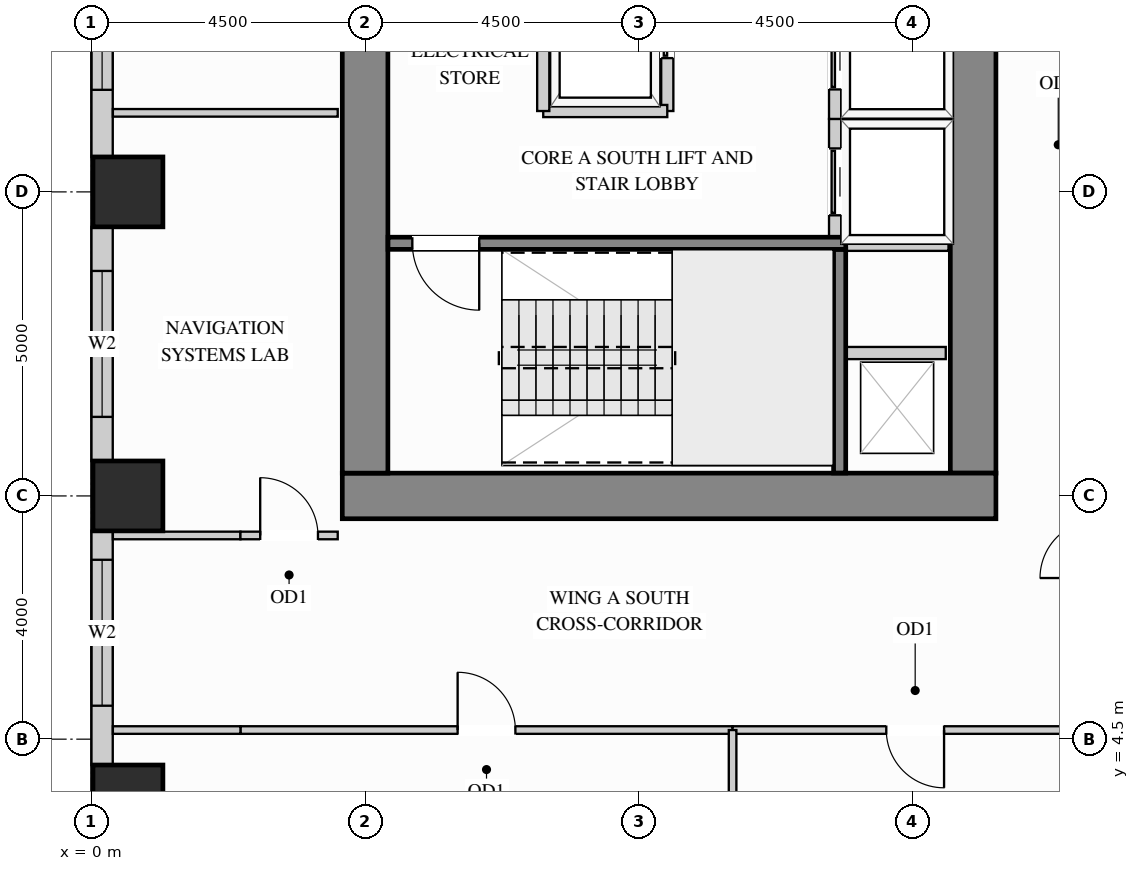
"""IFC4 building model, lengths in metres.
Left out: names, types, materials, properties, quantities, classifications, styles, units other than length and angle.
Written with IfcOpenShell. Run it as: python <this file> out.ifc"""

import sys

from ifc_helpers import new_model, si_unit, direction, frame, frame_2d, origin, origin_2d, place, context, subcontext, project, spatial, rectangle, extrude, source, transform, mapped, element, fill, save


model = new_model("IFC4")
c1 = context("Model", 3, precision=1e-05, world=origin(), true_north=direction((0.0, 1.0)))
c2 = subcontext(c1, "Body", "Model", "MODEL_VIEW")
j1 = project(units=[si_unit("LENGTHUNIT", "METRE"), si_unit("PLANEANGLEUNIT", "RADIAN")], contexts=[c1])
p1 = place(None, origin())
s1 = spatial("IfcSite", under=j1, at=p1, CompositionType="ELEMENT")
p2 = place(p1, origin())
s2 = spatial("IfcBuilding", under=s1, at=p2, CompositionType="ELEMENT")
p3 = place(p2, frame((0.0, 0.0, 77.4)))
s3 = spatial("IfcBuildingStorey", under=s2, at=p3, CompositionType="ELEMENT", Elevation=77.4)
m1 = source(origin(), c2, "Body", "SweptSolid", [
    extrude(rectangle(XDim=1.15, YDim=1.15, at=origin_2d()), origin(), (0.0, 0.0, 1.0), 3.38),
])
for number, where, z_axis, x_axis in (
    (1, (0.6, 13.5, 0.0), (0.0, 0.0, 1.0), (1.0, 0.0, 0.0)),
    (2, (0.6, 3.5, 0.0), (0.0, 0.0, 1.0), (1.0, 0.0, 0.0)),
    (3, (0.6, 8.5, 0.0), (0.0, 0.0, 1.0), (1.0, 0.0, 0.0)),
):
    element("IfcColumn", number, at=place(p3, frame(where, z_axis=z_axis, x_axis=x_axis)), inside=s3, PredefinedType="COLUMN", context=c2, shape_type="MappedRepresentation", body=[
        mapped(m1, transform((0.0, 0.0, 0.0), x_axis=(1.0, 0.0, 0.0), y_axis=(0.0, 1.0, 0.0), z_axis=(0.0, 0.0, 1.0))),
    ])
m2 = source(origin(), c2, "Body", "SweptSolid", [
    extrude(rectangle(XDim=9.945, YDim=0.75, at=frame_2d((4.973, 0.0))), origin(), (0.0, 0.0, 1.0), 3.38),
])
p4 = place(p3, frame((14.5, 8.875, 0.0), z_axis=(0.0, 0.0, 1.0), x_axis=(0.0, 1.0, 0.0)))
e4 = element("IfcWall", 4, at=p4, inside=s3, PredefinedType="SHEAR", context=c2, shape_type="MappedRepresentation", body=[
    mapped(m2, transform((0.0, 0.0, 0.0), x_axis=(1.0, 0.0, 0.0), y_axis=(0.0, 1.0, 0.0), z_axis=(0.0, 0.0, 1.0))),
])
m3 = source(origin(), c2, "Body", "SweptSolid", [
    extrude(rectangle(XDim=10.75, YDim=0.75, at=frame_2d((5.375, 0.0))), origin(), (0.0, 0.0, 1.0), 3.38),
])
p5 = place(p3, frame((4.125, 8.5, 0.0), z_axis=(0.0, 0.0, 1.0), x_axis=(1.0, 0.0, 0.0)))
e5 = element("IfcWall", 5, at=p5, inside=s3, PredefinedType="SHEAR", context=c2, shape_type="MappedRepresentation", body=[
    mapped(m3, transform((0.0, 0.0, 0.0), x_axis=(1.0, 0.0, 0.0), y_axis=(0.0, 1.0, 0.0), z_axis=(0.0, 0.0, 1.0))),
])
m4 = source(origin(), c2, "Body", "SweptSolid", [
    extrude(rectangle(XDim=20.25, YDim=0.75, at=frame_2d((10.125, 0.0))), origin(), (0.0, 0.0, 1.0), 3.38),
])
p6 = place(p3, frame((4.5, 8.875, 0.0), z_axis=(0.0, 0.0, 1.0), x_axis=(0.0, 1.0, 0.0)))
e6 = element("IfcWall", 6, at=p6, inside=s3, PredefinedType="SHEAR", context=c2, shape_type="MappedRepresentation", body=[
    mapped(m4, transform((0.0, 0.0, 0.0), x_axis=(1.0, 0.0, 0.0), y_axis=(0.0, 1.0, 0.0), z_axis=(0.0, 0.0, 1.0))),
])
p7 = place(p3, frame((0.175, 17.427, 0.0), z_axis=(0.0, 0.0, 1.0), x_axis=(0.0, -1.0, 0.0)))
e7 = element("IfcWall", 7, at=p7, inside=s3, PredefinedType="SOLIDWALL", context=c2, shape_type="SweptSolid", body=[
    extrude(rectangle(XDim=3.354, YDim=0.35, at=frame_2d((1.677, 0.0))), origin(), (0.0, 0.0, 1.0), 3.365),
])
p8 = place(p7, frame((0.448, 0.0, 0.78)))
e8 = element("IfcOpeningElement", 8, at=p8, cuts=e7, PredefinedType="OPENING", context=c2, shape_type="SweptSolid", body=[
    extrude(rectangle(XDim=1.8, YDim=2.1, at=frame_2d((0.9, 1.05))), frame((0.0, 0.185, 0.0), z_axis=(0.0, -1.0, 0.0), x_axis=(1.0, 0.0, 0.0)), (0.0, 0.0, 1.0), 0.37),
])
p9 = place(p3, frame((0.175, 12.927, 0.0), z_axis=(0.0, 0.0, 1.0), x_axis=(0.0, -1.0, 0.0)))
e9 = element("IfcWall", 9, at=p9, inside=s3, PredefinedType="SOLIDWALL", context=c2, shape_type="SweptSolid", body=[
    extrude(rectangle(XDim=3.854, YDim=0.35, at=frame_2d((1.927, 0.0))), origin(), (0.0, 0.0, 1.0), 3.365),
])
p10 = place(p9, frame((0.727, 0.0, 0.78)))
e10 = element("IfcOpeningElement", 10, at=p10, cuts=e9, PredefinedType="OPENING", context=c2, shape_type="SweptSolid", body=[
    extrude(rectangle(XDim=2.4, YDim=2.1, at=frame_2d((1.2, 1.05))), frame((0.0, 0.185, 0.0), z_axis=(0.0, -1.0, 0.0), x_axis=(1.0, 0.0, 0.0)), (0.0, 0.0, 1.0), 0.37),
])
p11 = place(p3, frame((0.175, 7.927, 0.0), z_axis=(0.0, 0.0, 1.0), x_axis=(0.0, -1.0, 0.0)))
e11 = element("IfcWall", 11, at=p11, inside=s3, PredefinedType="SOLIDWALL", context=c2, shape_type="SweptSolid", body=[
    extrude(rectangle(XDim=3.854, YDim=0.35, at=frame_2d((1.927, 0.0))), origin(), (0.0, 0.0, 1.0), 3.365),
])
p12 = place(p11, frame((0.477, 0.0, 0.78)))
e12 = element("IfcOpeningElement", 12, at=p12, cuts=e11, PredefinedType="OPENING", context=c2, shape_type="SweptSolid", body=[
    extrude(rectangle(XDim=2.4, YDim=2.1, at=frame_2d((1.2, 1.05))), frame((0.0, 0.185, 0.0), z_axis=(0.0, -1.0, 0.0), x_axis=(1.0, 0.0, 0.0)), (0.0, 0.0, 1.0), 0.37),
])
m5 = source(origin(), c2, "Body", "SweptSolid", [
    extrude(rectangle(XDim=2.098, YDim=0.125, at=frame_2d((1.049, 0.0))), origin(), (0.0, 0.0, 1.0), 3.365),
])
p13 = place(p3, frame((0.352, 7.85, 0.0), z_axis=(0.0, 0.0, 1.0), x_axis=(1.0, 0.0, 0.0)))
e13 = element("IfcWall", 13, at=p13, inside=s3, PredefinedType="PARTITIONING", context=c2, shape_type="MappedRepresentation", body=[
    mapped(m5, transform((0.0, 0.0, 0.0), x_axis=(1.0, 0.0, 0.0), y_axis=(0.0, 1.0, 0.0), z_axis=(0.0, 0.0, 1.0))),
])
p14 = place(p3, frame((2.45, 7.85, 0.0), z_axis=(0.0, 0.0, 1.0), x_axis=(1.0, 0.0, 0.0)))
e14 = element("IfcWall", 14, at=p14, inside=s3, PredefinedType="PARTITIONING", context=c2, shape_type="SweptSolid", body=[
    extrude(rectangle(XDim=1.6, YDim=0.125, at=frame_2d((0.8, 0.0))), origin(), (0.0, 0.0, 1.0), 3.365),
])
p15 = place(p14, frame((0.325, 0.0, 0.0)))
e15 = element("IfcOpeningElement", 15, at=p15, cuts=e14, PredefinedType="OPENING", context=c2, shape_type="SweptSolid", body=[
    extrude(rectangle(XDim=0.95, YDim=2.15, at=frame_2d((0.475, 1.075))), frame((0.0, 0.073, 0.0), z_axis=(0.0, -1.0, 0.0), x_axis=(1.0, 0.0, 0.0)), (0.0, 0.0, 1.0), 0.145),
])
p16 = place(p3, frame((2.45, 4.65, 0.0), z_axis=(0.0, 0.0, 1.0), x_axis=(1.0, 0.0, 0.0)))
e16 = element("IfcWall", 16, at=p16, inside=s3, PredefinedType="PARTITIONING", context=c2, shape_type="SweptSolid", body=[
    extrude(rectangle(XDim=8.094, YDim=0.125, at=frame_2d((4.047, 0.0))), origin(), (0.0, 0.0, 1.0), 2.828),
])
p17 = place(p16, frame((3.572, 0.0, 0.0)))
e17 = element("IfcOpeningElement", 17, at=p17, cuts=e16, PredefinedType="OPENING", context=c2, shape_type="SweptSolid", body=[
    extrude(rectangle(XDim=0.95, YDim=2.15, at=frame_2d((0.475, 1.075))), frame((0.0, 0.073, 0.0), z_axis=(0.0, -1.0, 0.0), x_axis=(1.0, 0.0, 0.0)), (0.0, 0.0, 1.0), 0.145),
])
p18 = place(p3, frame((10.544, 4.65, 0.0), z_axis=(0.0, 0.0, 1.0), x_axis=(1.0, 0.0, 0.0)))
e18 = element("IfcWall", 18, at=p18, inside=s3, PredefinedType="PARTITIONING", context=c2, shape_type="SweptSolid", body=[
    extrude(rectangle(XDim=6.006, YDim=0.125, at=frame_2d((3.003, 0.0))), origin(), (0.0, 0.0, 1.0), 2.828),
])
p19 = place(p18, frame((2.528, 0.0, 0.0)))
e19 = element("IfcOpeningElement", 19, at=p19, cuts=e18, PredefinedType="OPENING", context=c2, shape_type="SweptSolid", body=[
    extrude(rectangle(XDim=0.95, YDim=2.15, at=frame_2d((0.475, 1.075))), frame((0.0, 0.073, 0.0), z_axis=(0.0, -1.0, 0.0), x_axis=(1.0, 0.0, 0.0)), (0.0, 0.0, 1.0), 0.145),
])
m6 = source(origin(), c2, "Body", "SweptSolid", [
    extrude(rectangle(XDim=2.098, YDim=0.125, at=frame_2d((1.049, 0.0))), origin(), (0.0, 0.0, 1.0), 2.828),
])
p20 = place(p3, frame((0.352, 4.65, 0.0), z_axis=(0.0, 0.0, 1.0), x_axis=(1.0, 0.0, 0.0)))
e20 = element("IfcWall", 20, at=p20, inside=s3, PredefinedType="PARTITIONING", context=c2, shape_type="MappedRepresentation", body=[
    mapped(m6, transform((0.0, 0.0, 0.0), x_axis=(1.0, 0.0, 0.0), y_axis=(0.0, 1.0, 0.0), z_axis=(0.0, 0.0, 1.0))),
])
m7 = source(origin(), c2, "Body", "SweptSolid", [
    extrude(rectangle(XDim=4.298, YDim=0.125, at=frame_2d((2.149, 0.0))), origin(), (0.0, 0.0, 1.0), 3.365),
])
p21 = place(p3, frame((10.544, 0.352, 0.0), z_axis=(0.0, 0.0, 1.0), x_axis=(0.0, 1.0, 0.0)))
e21 = element("IfcWall", 21, at=p21, inside=s3, PredefinedType="PARTITIONING", context=c2, shape_type="MappedRepresentation", body=[
    mapped(m7, transform((0.0, 0.0, 0.0), x_axis=(1.0, 0.0, 0.0), y_axis=(0.0, 1.0, 0.0), z_axis=(0.0, 0.0, 1.0))),
])
m8 = source(origin(), c2, "Body", "SweptSolid", [
    extrude(rectangle(XDim=3.698, YDim=0.125, at=frame_2d((1.849, 0.0))), origin(), (0.0, 0.0, 1.0), 3.365),
])
p22 = place(p3, frame((0.352, 14.8, 0.0), z_axis=(0.0, 0.0, 1.0), x_axis=(1.0, 0.0, 0.0)))
e22 = element("IfcWall", 22, at=p22, inside=s3, PredefinedType="PARTITIONING", context=c2, shape_type="MappedRepresentation", body=[
    mapped(m8, transform((0.0, 0.0, 0.0), x_axis=(1.0, 0.0, 0.0), y_axis=(0.0, 1.0, 0.0), z_axis=(0.0, 0.0, 1.0))),
])
m9 = source(origin(), c2, "Body", "SweptSolid", [
    extrude(rectangle(XDim=1.63, YDim=0.2, at=frame_2d((0.815, 0.0))), origin(), (0.0, 0.0, 1.0), 3.365),
])
p23 = place(p3, frame((12.42, 10.85, 0.0), z_axis=(0.0, 0.0, 1.0), x_axis=(1.0, 0.0, 0.0)))
e23 = element("IfcWall", 23, at=p23, inside=s3, PredefinedType="PARTITIONING", context=c2, shape_type="MappedRepresentation", body=[
    mapped(m9, transform((0.0, 0.0, 0.0), x_axis=(1.0, 0.0, 0.0), y_axis=(0.0, 1.0, 0.0), z_axis=(0.0, 0.0, 1.0))),
])
m10 = source(origin(), c2, "Body", "SweptSolid", [
    extrude(rectangle(XDim=1.865, YDim=0.2, at=frame_2d((0.933, 0.0))), origin(), (0.0, 0.0, 1.0), 3.365),
])
for number, where, z_axis, x_axis in (
    (24, (12.23, 14.7, 0.0), (0.0, 0.0, 1.0), (1.0, 0.0, 0.0)),
    (25, (12.23, 12.63, 0.0), (0.0, 0.0, 1.0), (1.0, 0.0, 0.0)),
):
    element("IfcWall", number, at=place(p3, frame(where, z_axis=z_axis, x_axis=x_axis)), inside=s3, PredefinedType="PARTITIONING", context=c2, shape_type="MappedRepresentation", body=[
        mapped(m10, transform((0.0, 0.0, 0.0), x_axis=(1.0, 0.0, 0.0), y_axis=(0.0, 1.0, 0.0), z_axis=(0.0, 0.0, 1.0))),
    ])
p24 = place(p3, frame((12.23, 12.63, 0.0), z_axis=(0.0, 0.0, 1.0), x_axis=(0.0, 1.0, 0.0)))
e26 = element("IfcWall", 26, at=p24, inside=s3, PredefinedType="PARTITIONING", context=c2, shape_type="SweptSolid", body=[
    extrude(rectangle(XDim=2.07, YDim=0.2, at=frame_2d((1.035, 0.0))), origin(), (0.0, 0.0, 1.0), 3.365),
])
p25 = place(p24, frame((0.485, 0.0, 0.0)))
e27 = element("IfcOpeningElement", 27, at=p25, cuts=e26, PredefinedType="OPENING", context=c2, shape_type="SweptSolid", body=[
    extrude(rectangle(XDim=1.1, YDim=2.2, at=frame_2d((0.55, 1.1))), frame((0.0, 0.11, 0.0), z_axis=(0.0, -1.0, 0.0), x_axis=(1.0, 0.0, 0.0)), (0.0, 0.0, 1.0), 0.22),
])
p26 = place(p3, frame((12.23, 14.7, 0.0), z_axis=(0.0, 0.0, 1.0), x_axis=(0.0, 1.0, 0.0)))
e28 = element("IfcWall", 28, at=p26, inside=s3, PredefinedType="PARTITIONING", context=c2, shape_type="SweptSolid", body=[
    extrude(rectangle(XDim=2.07, YDim=0.2, at=frame_2d((1.035, 0.0))), origin(), (0.0, 0.0, 1.0), 3.365),
])
p27 = place(p26, frame((0.485, 0.0, 0.0)))
e29 = element("IfcOpeningElement", 29, at=p27, cuts=e28, PredefinedType="OPENING", context=c2, shape_type="SweptSolid", body=[
    extrude(rectangle(XDim=1.1, YDim=2.2, at=frame_2d((0.55, 1.1))), frame((0.0, 0.11, 0.0), z_axis=(0.0, -1.0, 0.0), x_axis=(1.0, 0.0, 0.0)), (0.0, 0.0, 1.0), 0.22),
])
p28 = place(p3, frame((9.47, 14.83, 0.0), z_axis=(0.0, 0.0, 1.0), x_axis=(0.0, 1.0, 0.0)))
e30 = element("IfcWall", 30, at=p28, inside=s3, PredefinedType="PARTITIONING", context=c2, shape_type="SweptSolid", body=[
    extrude(rectangle(XDim=2.84, YDim=0.2, at=frame_2d((1.42, 0.0))), origin(), (0.0, 0.0, 1.0), 3.365),
])
p29 = place(p28, frame((0.87, 0.0, 0.0)))
e31 = element("IfcOpeningElement", 31, at=p29, cuts=e30, PredefinedType="OPENING", context=c2, shape_type="SweptSolid", body=[
    extrude(rectangle(XDim=1.1, YDim=2.2, at=frame_2d((0.55, 1.1))), frame((0.0, 0.11, 0.0), z_axis=(0.0, -1.0, 0.0), x_axis=(1.0, 0.0, 0.0)), (0.0, 0.0, 1.0), 0.22),
])
m11 = source(origin(), c2, "Body", "SweptSolid", [
    extrude(rectangle(XDim=2.04, YDim=0.2, at=frame_2d((1.02, 0.0))), origin(), (0.0, 0.0, 1.0), 3.365),
])
p30 = place(p3, frame((7.43, 14.83, 0.0), z_axis=(0.0, 0.0, 1.0), x_axis=(1.0, 0.0, 0.0)))
e32 = element("IfcWall", 32, at=p30, inside=s3, PredefinedType="PARTITIONING", context=c2, shape_type="MappedRepresentation", body=[
    mapped(m11, transform((0.0, 0.0, 0.0), x_axis=(1.0, 0.0, 0.0), y_axis=(0.0, 1.0, 0.0), z_axis=(0.0, 0.0, 1.0))),
])
m12 = source(origin(), c2, "Body", "SweptSolid", [
    extrude(rectangle(XDim=2.84, YDim=0.2, at=frame_2d((1.42, 0.0))), origin(), (0.0, 0.0, 1.0), 3.365),
])
p31 = place(p3, frame((7.43, 14.83, 0.0), z_axis=(0.0, 0.0, 1.0), x_axis=(0.0, 1.0, 0.0)))
e33 = element("IfcWall", 33, at=p31, inside=s3, PredefinedType="PARTITIONING", context=c2, shape_type="MappedRepresentation", body=[
    mapped(m12, transform((0.0, 0.0, 0.0), x_axis=(1.0, 0.0, 0.0), y_axis=(0.0, 1.0, 0.0), z_axis=(0.0, 0.0, 1.0))),
])
m13 = source(origin(), c2, "Body", "SweptSolid", [
    extrude(rectangle(XDim=3.678, YDim=0.2, at=frame_2d((1.839, 0.0))), origin(), (0.0, 0.0, 1.0), 3.38),
])
p32 = place(p3, frame((12.305, 8.877, 0.0), z_axis=(0.0, 0.0, 1.0), x_axis=(0.0, 1.0, 0.0)))
e34 = element("IfcWall", 34, at=p32, inside=s3, PredefinedType="SHEAR", context=c2, shape_type="MappedRepresentation", body=[
    mapped(m13, transform((0.0, 0.0, 0.0), x_axis=(1.0, 0.0, 0.0), y_axis=(0.0, 1.0, 0.0), z_axis=(0.0, 0.0, 1.0))),
])
p33 = place(p3, frame((4.877, 12.655, 0.0), z_axis=(0.0, 0.0, 1.0), x_axis=(1.0, 0.0, 0.0)))
e35 = element("IfcWall", 35, at=p33, inside=s3, PredefinedType="SHEAR", context=c2, shape_type="SweptSolid", body=[
    extrude(rectangle(XDim=7.528, YDim=0.2, at=frame_2d((3.764, 0.0))), origin(), (0.0, 0.0, 1.0), 3.38),
])
p34 = place(p33, frame((0.4, 0.0, 0.0)))
e36 = element("IfcOpeningElement", 36, at=p34, cuts=e35, PredefinedType="OPENING", context=c2, shape_type="SweptSolid", body=[
    extrude(rectangle(XDim=1.1, YDim=2.15, at=frame_2d((0.55, 1.075))), frame((0.0, 0.11, 0.0), z_axis=(0.0, -1.0, 0.0), x_axis=(1.0, 0.0, 0.0)), (0.0, 0.0, 1.0), 0.22),
])
m14 = source(origin(), c2, "Body", "SweptSolid", [
    extrude(rectangle(XDim=1.1, YDim=2.2, at=frame_2d((0.55, 1.1))), frame((0.0, 0.025, 0.0), z_axis=(0.0, -1.0, 0.0), x_axis=(1.0, 0.0, 0.0)), (0.0, 0.0, 1.0), 0.05),
])
p35 = place(p25, origin())
e37 = element("IfcDoor", 37, at=p35, inside=s3, OperationType="SLIDING_TO_LEFT", PredefinedType="DOOR", context=c2, shape_type="MappedRepresentation", body=[
    mapped(m14, transform((0.0, 0.0, 0.0), x_axis=(1.0, 0.0, 0.0), y_axis=(0.0, 1.0, 0.0), z_axis=(0.0, 0.0, 1.0))),
])
fill(e27, e37)
p36 = place(p27, origin())
e38 = element("IfcDoor", 38, at=p36, inside=s3, OperationType="SLIDING_TO_LEFT", PredefinedType="DOOR", context=c2, shape_type="MappedRepresentation", body=[
    mapped(m14, transform((0.0, 0.0, 0.0), x_axis=(1.0, 0.0, 0.0), y_axis=(0.0, 1.0, 0.0), z_axis=(0.0, 0.0, 1.0))),
])
fill(e29, e38)
p37 = place(p29, origin())
e39 = element("IfcDoor", 39, at=p37, inside=s3, OperationType="SLIDING_TO_LEFT", PredefinedType="DOOR", context=c2, shape_type="MappedRepresentation", body=[
    mapped(m14, transform((0.0, 0.0, 0.0), x_axis=(1.0, 0.0, 0.0), y_axis=(0.0, 1.0, 0.0), z_axis=(0.0, 0.0, 1.0))),
])
fill(e31, e39)
m15 = source(origin(), c2, "Body", "SweptSolid", [
    extrude(rectangle(XDim=0.95, YDim=2.15, at=frame_2d((0.475, 1.075))), frame((0.0, 0.025, 0.0), z_axis=(0.0, -1.0, 0.0), x_axis=(1.0, 0.0, 0.0)), (0.0, 0.0, 1.0), 0.05),
])
p38 = place(p17, origin())
e40 = element("IfcDoor", 40, at=p38, inside=s3, OperationType="SINGLE_SWING_LEFT", PredefinedType="DOOR", context=c2, shape_type="MappedRepresentation", body=[
    mapped(m15, transform((0.0, 0.0, 0.0), x_axis=(1.0, 0.0, 0.0), y_axis=(0.0, 1.0, 0.0), z_axis=(0.0, 0.0, 1.0))),
])
fill(e17, e40)
p39 = place(p19, origin())
e41 = element("IfcDoor", 41, at=p39, inside=s3, OperationType="SINGLE_SWING_RIGHT", PredefinedType="DOOR", context=c2, shape_type="MappedRepresentation", body=[
    mapped(m15, transform((0.0, 0.0, 0.0), x_axis=(1.0, 0.0, 0.0), y_axis=(0.0, 1.0, 0.0), z_axis=(0.0, 0.0, 1.0))),
])
fill(e19, e41)
p40 = place(p15, origin())
e42 = element("IfcDoor", 42, at=p40, inside=s3, OperationType="SINGLE_SWING_LEFT", PredefinedType="DOOR", context=c2, shape_type="MappedRepresentation", body=[
    mapped(m15, transform((0.0, 0.0, 0.0), x_axis=(1.0, 0.0, 0.0), y_axis=(0.0, 1.0, 0.0), z_axis=(0.0, 0.0, 1.0))),
])
fill(e15, e42)
m16 = source(origin(), c2, "Body", "SweptSolid", [
    extrude(rectangle(XDim=1.1, YDim=2.15, at=frame_2d((0.55, 1.075))), frame((0.0, 0.025, 0.0), z_axis=(0.0, -1.0, 0.0), x_axis=(1.0, 0.0, 0.0)), (0.0, 0.0, 1.0), 0.05),
])
p41 = place(p34, origin())
e43 = element("IfcDoor", 43, at=p41, inside=s3, OperationType="SINGLE_SWING_RIGHT", PredefinedType="DOOR", context=c2, shape_type="MappedRepresentation", body=[
    mapped(m16, transform((0.0, 0.0, 0.0), x_axis=(1.0, 0.0, 0.0), y_axis=(0.0, 1.0, 0.0), z_axis=(0.0, 0.0, 1.0))),
])
fill(e36, e43)
m17 = source(origin(), c2, "Body", "SweptSolid", [
    extrude(rectangle(XDim=1.8, YDim=2.1, at=frame_2d((0.9, 1.05))), frame((0.0, 0.03, 0.0), z_axis=(0.0, -1.0, 0.0), x_axis=(1.0, 0.0, 0.0)), (0.0, 0.0, 1.0), 0.06),
])
p42 = place(p8, origin())
e44 = element("IfcWindow", 44, at=p42, inside=s3, PartitioningType="SINGLE_PANEL", PredefinedType="WINDOW", context=c2, shape_type="MappedRepresentation", body=[
    mapped(m17, transform((0.0, 0.0, 0.0), x_axis=(1.0, 0.0, 0.0), y_axis=(0.0, 1.0, 0.0), z_axis=(0.0, 0.0, 1.0))),
])
fill(e8, e44)
m18 = source(origin(), c2, "Body", "SweptSolid", [
    extrude(rectangle(XDim=2.4, YDim=2.1, at=frame_2d((1.2, 1.05))), frame((0.0, 0.03, 0.0), z_axis=(0.0, -1.0, 0.0), x_axis=(1.0, 0.0, 0.0)), (0.0, 0.0, 1.0), 0.06),
])
p43 = place(p10, origin())
e45 = element("IfcWindow", 45, at=p43, inside=s3, PartitioningType="SINGLE_PANEL", PredefinedType="WINDOW", context=c2, shape_type="MappedRepresentation", body=[
    mapped(m18, transform((0.0, 0.0, 0.0), x_axis=(1.0, 0.0, 0.0), y_axis=(0.0, 1.0, 0.0), z_axis=(0.0, 0.0, 1.0))),
])
fill(e10, e45)
p44 = place(p12, origin())
e46 = element("IfcWindow", 46, at=p44, inside=s3, PartitioningType="SINGLE_PANEL", PredefinedType="WINDOW", context=c2, shape_type="MappedRepresentation", body=[
    mapped(m18, transform((0.0, 0.0, 0.0), x_axis=(1.0, 0.0, 0.0), y_axis=(0.0, 1.0, 0.0), z_axis=(0.0, 0.0, 1.0))),
])
fill(e12, e46)
save(model, sys.argv[1])
